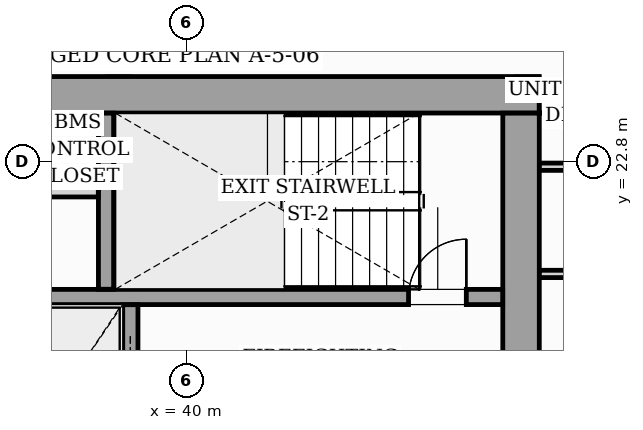
"""IFC4 building model, lengths in metres.
Left out: names, types, materials, properties, quantities, classifications, styles, units other than length and angle.
Written with IfcOpenShell. Run it as: python <this file> out.ifc"""

import sys

from ifc_helpers import new_model, si_unit, direction, frame, frame_2d, origin, origin_2d, place, context, subcontext, project, spatial, rectangle, i_section, extrude, source, transform, mapped, element, fill, save


model = new_model("IFC4")
c1 = context("Model", 3, precision=1e-05, world=origin(), true_north=direction((0.0, 1.0)))
c2 = subcontext(c1, "Body", "Model", "MODEL_VIEW")
j1 = project(units=[si_unit("LENGTHUNIT", "METRE"), si_unit("PLANEANGLEUNIT", "RADIAN")], contexts=[c1])
p1 = place(None, origin())
s1 = spatial("IfcSite", under=j1, at=p1, CompositionType="ELEMENT")
p2 = place(p1, origin())
s2 = spatial("IfcBuilding", under=s1, at=p2, CompositionType="ELEMENT")
p3 = place(p2, frame((0.0, 0.0, 226.5)))
s3 = spatial("IfcBuildingStorey", under=s2, at=p3, CompositionType="ELEMENT", Elevation=226.5)
m1 = source(origin(), c2, "Body", "SweptSolid", [
    extrude(i_section(OverallWidth=0.409, OverallDepth=0.425, WebThickness=0.033, FlangeThickness=0.052, FilletRadius=0.018, at=origin_2d()), origin(), (0.0, 0.0, 1.0), 3.296),
])
for number, where, z_axis, x_axis in (
    (1, (38.88, 24.0, 0.002), (0.0, 0.0, 1.0), (1.0, 0.0, 0.0)),
    (2, (45.6, 24.0, 0.002), (0.0, 0.0, 1.0), (1.0, 0.0, 0.0)),
):
    element("IfcColumn", number, at=place(p3, frame(where, z_axis=z_axis, x_axis=x_axis)), inside=s3, PredefinedType="PILASTER", context=c2, shape_type="MappedRepresentation", body=[
        mapped(m1, transform((0.0, 0.0, 0.0), scale=1.0)),
    ])
p4 = place(p3, frame((26.2, 23.9, 0.0), z_axis=(0.0, 0.0, 1.0), x_axis=(1.0, 0.0, 0.0)))
e3 = element("IfcWall", 3, at=p4, inside=s3, PredefinedType="SHEAR", context=c2, shape_type="SweptSolid", body=[
    extrude(rectangle(XDim=19.6, YDim=0.6, at=frame_2d((9.8, 0.0))), origin(), (0.0, 0.0, 1.0), 3.3),
])
p5 = place(p3, frame((45.5, 17.802, 0.0), z_axis=(0.0, 0.0, 1.0), x_axis=(0.0, 1.0, 0.0)))
e4 = element("IfcWall", 4, at=p5, inside=s3, PredefinedType="SHEAR", context=c2, shape_type="SweptSolid", body=[
    extrude(rectangle(XDim=5.796, YDim=0.6, at=frame_2d((2.898, 0.0))), origin(), (0.0, 0.0, 1.0), 3.3),
])
p6 = place(p3, frame((37.05, 20.575, 0.0), z_axis=(0.0, 0.0, 1.0), x_axis=(1.0, 0.0, 0.0)))
e5 = element("IfcWall", 5, at=p6, inside=s3, PredefinedType="SOLIDWALL", context=c2, shape_type="SweptSolid", body=[
    extrude(rectangle(XDim=8.148, YDim=0.25, at=frame_2d((4.074, 0.0))), origin(), (0.0, 0.0, 1.0), 3.3),
])
p7 = place(p6, frame((6.6, 0.0, 0.0)))
e6 = element("IfcOpeningElement", 6, at=p7, cuts=e5, PredefinedType="OPENING", context=c2, shape_type="SweptSolid", body=[
    extrude(rectangle(XDim=0.95, YDim=2.06, at=frame_2d((0.475, 1.03))), frame((0.0, 0.135, 0.0), z_axis=(0.0, -1.0, 0.0), x_axis=(1.0, 0.0, 0.0)), (0.0, 0.0, 1.0), 0.27),
])
p8 = place(p3, frame((38.675, 20.702, 0.0), z_axis=(0.0, 0.0, 1.0), x_axis=(0.0, 1.0, 0.0)))
e7 = element("IfcWall", 7, at=p8, inside=s3, PredefinedType="SOLIDWALL", context=c2, shape_type="SweptSolid", body=[
    extrude(rectangle(XDim=2.896, YDim=0.25, at=frame_2d((1.448, 0.0))), origin(), (0.0, 0.0, 1.0), 3.3),
])
p9 = place(p3, frame((39.075, 17.802, 0.0), z_axis=(0.0, 0.0, 1.0), x_axis=(0.0, 1.0, 0.0)))
e8 = element("IfcWall", 8, at=p9, inside=s3, PredefinedType="SOLIDWALL", context=c2, shape_type="SweptSolid", body=[
    extrude(rectangle(XDim=2.646, YDim=0.25, at=frame_2d((1.323, 0.0))), origin(), (0.0, 0.0, 1.0), 3.3),
])
p10 = place(p9, frame((0.548, 0.0, 0.0)))
e9 = element("IfcOpeningElement", 9, at=p10, cuts=e8, PredefinedType="OPENING", context=c2, shape_type="SweptSolid", body=[
    extrude(rectangle(XDim=1.1, YDim=2.08, at=frame_2d((0.55, 1.04))), frame((0.0, 0.135, 0.0), z_axis=(0.0, -1.0, 0.0), x_axis=(1.0, 0.0, 0.0)), (0.0, 0.0, 1.0), 0.27),
])
p11 = place(p3, frame((34.982, 22.3, 0.0), z_axis=(0.0, 0.0, 1.0), x_axis=(1.0, 0.0, 0.0)))
e10 = element("IfcWall", 10, at=p11, inside=s3, PredefinedType="PARTITIONING", context=c2, shape_type="SweptSolid", body=[
    extrude(rectangle(XDim=3.566, YDim=0.16, at=frame_2d((1.783, 0.0))), origin(), (0.0, 0.0, 1.0), 3.04),
])
p12 = place(p11, frame((1.378, 0.0, 0.0)))
e11 = element("IfcOpeningElement", 11, at=p12, cuts=e10, PredefinedType="OPENING", context=c2, shape_type="SweptSolid", body=[
    extrude(rectangle(XDim=0.8, YDim=2.05, at=frame_2d((0.4, 1.025))), frame((0.0, 0.09, 0.0), z_axis=(0.0, -1.0, 0.0), x_axis=(1.0, 0.0, 0.0)), (0.0, 0.0, 1.0), 0.18),
])
p13 = place(p3, frame((45.88, 23.598, 0.0), z_axis=(0.0, 0.0, 1.0), x_axis=(0.0, 1.0, 0.0)))
e12 = element("IfcWall", 12, at=p13, inside=s3, PredefinedType="PARTITIONING", context=c2, shape_type="SweptSolid", body=[
    extrude(rectangle(XDim=0.452, YDim=0.16, at=frame_2d((0.226, 0.0))), origin(), (0.0, 0.0, 1.0), 3.04),
])
p14 = place(p3, frame((45.802, 22.717, 0.0), z_axis=(0.0, 0.0, 1.0), x_axis=(1.0, 0.0, 0.0)))
e13 = element("IfcWall", 13, at=p14, inside=s3, PredefinedType="PARTITIONING", context=c2, shape_type="SweptSolid", body=[
    extrude(rectangle(XDim=9.406, YDim=0.12, at=frame_2d((4.703, 0.0))), origin(), (0.0, 0.0, 1.0), 3.04),
])
p15 = place(p14, frame((4.397, 0.0, 0.0)))
e14 = element("IfcOpeningElement", 14, at=p15, cuts=e13, PredefinedType="OPENING", context=c2, shape_type="SweptSolid", body=[
    extrude(rectangle(XDim=0.85, YDim=2.05, at=frame_2d((0.425, 1.025))), frame((0.0, 0.07, 0.0), z_axis=(0.0, -1.0, 0.0), x_axis=(1.0, 0.0, 0.0)), (0.0, 0.0, 1.0), 0.14),
])
p16 = place(p3, frame((45.802, 20.954, 0.0), z_axis=(0.0, 0.0, 1.0), x_axis=(1.0, 0.0, 0.0)))
e15 = element("IfcWall", 15, at=p16, inside=s3, PredefinedType="PARTITIONING", context=c2, shape_type="SweptSolid", body=[
    extrude(rectangle(XDim=10.683, YDim=0.12, at=frame_2d((5.342, 0.0))), origin(), (0.0, 0.0, 1.0), 3.04),
])
p17 = place(p16, frame((5.062, 0.0, 0.0)))
e16 = element("IfcOpeningElement", 16, at=p17, cuts=e15, PredefinedType="OPENING", context=c2, shape_type="SweptSolid", body=[
    extrude(rectangle(XDim=0.85, YDim=2.05, at=frame_2d((0.425, 1.025))), frame((0.0, 0.07, 0.0), z_axis=(0.0, -1.0, 0.0), x_axis=(1.0, 0.0, 0.0)), (0.0, 0.0, 1.0), 0.14),
])
m2 = source(origin(), c2, "Body", "SweptSolid", [
    extrude(rectangle(XDim=0.95, YDim=2.06, at=frame_2d((0.475, 1.03))), frame((0.0, 0.025, 0.0), z_axis=(0.0, -1.0, 0.0), x_axis=(1.0, 0.0, 0.0)), (0.0, 0.0, 1.0), 0.05),
])
p18 = place(p7, origin())
e17 = element("IfcDoor", 17, at=p18, inside=s3, OperationType="SINGLE_SWING_RIGHT", PredefinedType="DOOR", context=c2, shape_type="MappedRepresentation", body=[
    mapped(m2, transform((0.0, 0.0, 0.0), scale=1.0)),
])
fill(e6, e17)
save(model, sys.argv[1])
